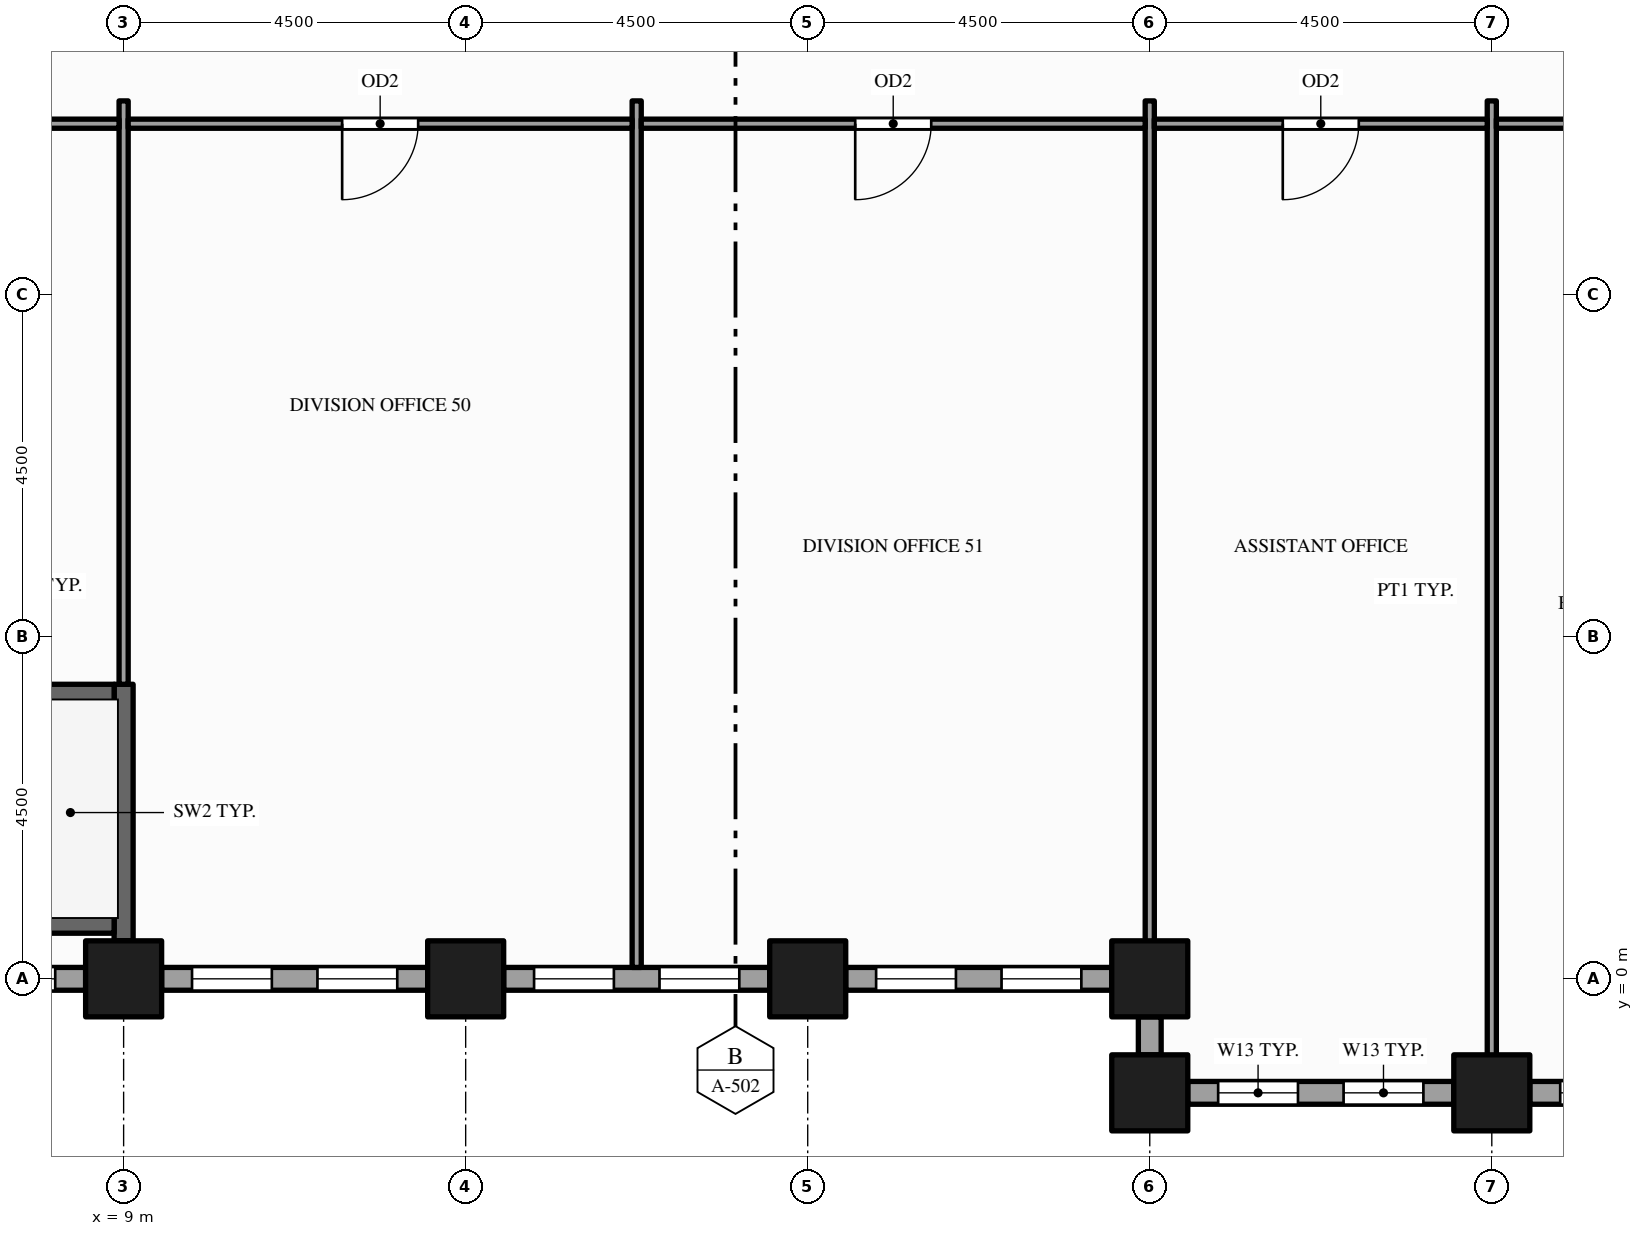
"""IFC4 building model, lengths in metres.
Left out: names, types, materials, properties, quantities, classifications, styles, units other than length and angle.
Written with IfcOpenShell. Run it as: python <this file> out.ifc"""

import sys

from ifc_helpers import new_model, si_unit, direction, frame, frame_2d, origin, origin_2d, place, context, subcontext, project, spatial, rectangle, hollow_rectangle, extrude, element, fill, save


model = new_model("IFC4")
c1 = context("Model", 3, precision=1e-05, world=origin(), true_north=direction((0.0, 1.0)))
c2 = subcontext(c1, "Body", "Model", "MODEL_VIEW")
j1 = project(units=[si_unit("LENGTHUNIT", "METRE"), si_unit("PLANEANGLEUNIT", "RADIAN")], contexts=[c1])
p1 = place(None, origin())
s1 = spatial("IfcSite", under=j1, at=p1, CompositionType="ELEMENT")
p2 = place(p1, origin())
s2 = spatial("IfcBuilding", under=s1, at=p2, CompositionType="ELEMENT")
p3 = place(p2, frame((0.0, 0.0, 83.0)))
s3 = spatial("IfcBuildingStorey", under=s2, at=p3, CompositionType="ELEMENT", Elevation=83.0)
for number, where, z_axis, x_axis in (
    (1, (9.0, 0.0, -0.15), (0.0, 0.0, 1.0), (1.0, 0.0, 0.0)),
    (2, (13.5, 0.0, -0.15), (0.0, 0.0, 1.0), (1.0, 0.0, 0.0)),
    (3, (18.0, 0.0, -0.15), (0.0, 0.0, 1.0), (1.0, 0.0, 0.0)),
    (4, (22.5, -1.5, -0.15), (0.0, 0.0, 1.0), (1.0, 0.0, 0.0)),
    (5, (22.5, 0.0, -0.15), (0.0, 0.0, 1.0), (1.0, 0.0, 0.0)),
    (6, (27.0, -1.5, -0.15), (0.0, 0.0, 1.0), (1.0, 0.0, 0.0)),
):
    element("IfcColumn", number, at=place(p3, frame(where, z_axis=z_axis, x_axis=x_axis)), inside=s3, PredefinedType="COLUMN", context=c2, shape_type="SweptSolid", body=[
        extrude(hollow_rectangle(XDim=1.0, YDim=1.0, WallThickness=0.05, at=origin_2d()), origin(), (0.0, 0.0, 1.0), 4.0),
    ])
p4 = place(p3, frame((23.0, -1.5, 0.0), z_axis=(0.0, 0.0, 1.0), x_axis=(1.0, 0.0, 0.0)))
e7 = element("IfcWall", 7, at=p4, inside=s3, PredefinedType="STANDARD", context=c2, shape_type="SweptSolid", body=[
    extrude(rectangle(XDim=3.5, YDim=0.3, at=frame_2d((1.75, 0.0))), origin(), (0.0, 0.0, 1.0), 3.154),
])
p5 = place(p4, frame((0.4, 0.0, 0.9)))
e8 = element("IfcOpeningElement", 8, at=p5, cuts=e7, PredefinedType="OPENING", context=c2, shape_type="SweptSolid", body=[
    extrude(rectangle(XDim=1.05, YDim=2.0, at=frame_2d((0.525, 1.0))), frame((0.0, 0.16, 0.0), z_axis=(0.0, -1.0, 0.0), x_axis=(1.0, 0.0, 0.0)), (0.0, 0.0, 1.0), 0.32),
])
p6 = place(p4, frame((2.05, 0.0, 0.9)))
e9 = element("IfcOpeningElement", 9, at=p6, cuts=e7, PredefinedType="OPENING", context=c2, shape_type="SweptSolid", body=[
    extrude(rectangle(XDim=1.05, YDim=2.0, at=frame_2d((0.525, 1.0))), frame((0.0, 0.16, 0.0), z_axis=(0.0, -1.0, 0.0), x_axis=(1.0, 0.0, 0.0)), (0.0, 0.0, 1.0), 0.32),
])
p7 = place(p3, frame((27.5, -1.5, 0.0), z_axis=(0.0, 0.0, 1.0), x_axis=(1.0, 0.0, 0.0)))
e10 = element("IfcWall", 10, at=p7, inside=s3, PredefinedType="STANDARD", context=c2, shape_type="SweptSolid", body=[
    extrude(rectangle(XDim=3.5, YDim=0.3, at=frame_2d((1.75, 0.0))), origin(), (0.0, 0.0, 1.0), 3.154),
])
p8 = place(p7, frame((0.4, 0.0, 0.9)))
e11 = element("IfcOpeningElement", 11, at=p8, cuts=e10, PredefinedType="OPENING", context=c2, shape_type="SweptSolid", body=[
    extrude(rectangle(XDim=1.05, YDim=2.0, at=frame_2d((0.525, 1.0))), frame((0.0, 0.16, 0.0), z_axis=(0.0, -1.0, 0.0), x_axis=(1.0, 0.0, 0.0)), (0.0, 0.0, 1.0), 0.32),
])
p9 = place(p7, frame((2.05, 0.0, 0.9)))
e12 = element("IfcOpeningElement", 12, at=p9, cuts=e10, PredefinedType="OPENING", context=c2, shape_type="SweptSolid", body=[
    extrude(rectangle(XDim=1.05, YDim=2.0, at=frame_2d((0.525, 1.0))), frame((0.0, 0.16, 0.0), z_axis=(0.0, -1.0, 0.0), x_axis=(1.0, 0.0, 0.0)), (0.0, 0.0, 1.0), 0.32),
])
p10 = place(p3, frame((5.0, 0.0, 0.0), z_axis=(0.0, 0.0, 1.0), x_axis=(1.0, 0.0, 0.0)))
e13 = element("IfcWall", 13, at=p10, inside=s3, PredefinedType="STANDARD", context=c2, shape_type="SweptSolid", body=[
    extrude(rectangle(XDim=3.5, YDim=0.3, at=frame_2d((1.75, 0.0))), origin(), (0.0, 0.0, 1.0), 3.154),
])
p11 = place(p10, frame((0.4, 0.0, 0.9)))
e14 = element("IfcOpeningElement", 14, at=p11, cuts=e13, PredefinedType="OPENING", context=c2, shape_type="SweptSolid", body=[
    extrude(rectangle(XDim=1.05, YDim=2.0, at=frame_2d((0.525, 1.0))), frame((0.0, 0.16, 0.0), z_axis=(0.0, -1.0, 0.0), x_axis=(1.0, 0.0, 0.0)), (0.0, 0.0, 1.0), 0.32),
])
p12 = place(p10, frame((2.05, 0.0, 0.9)))
e15 = element("IfcOpeningElement", 15, at=p12, cuts=e13, PredefinedType="OPENING", context=c2, shape_type="SweptSolid", body=[
    extrude(rectangle(XDim=1.05, YDim=2.0, at=frame_2d((0.525, 1.0))), frame((0.0, 0.16, 0.0), z_axis=(0.0, -1.0, 0.0), x_axis=(1.0, 0.0, 0.0)), (0.0, 0.0, 1.0), 0.32),
])
p13 = place(p3, frame((9.5, 0.0, 0.0), z_axis=(0.0, 0.0, 1.0), x_axis=(1.0, 0.0, 0.0)))
e16 = element("IfcWall", 16, at=p13, inside=s3, PredefinedType="STANDARD", context=c2, shape_type="SweptSolid", body=[
    extrude(rectangle(XDim=3.5, YDim=0.3, at=frame_2d((1.75, 0.0))), origin(), (0.0, 0.0, 1.0), 3.154),
])
p14 = place(p13, frame((0.4, 0.0, 0.9)))
e17 = element("IfcOpeningElement", 17, at=p14, cuts=e16, PredefinedType="OPENING", context=c2, shape_type="SweptSolid", body=[
    extrude(rectangle(XDim=1.05, YDim=2.0, at=frame_2d((0.525, 1.0))), frame((0.0, 0.16, 0.0), z_axis=(0.0, -1.0, 0.0), x_axis=(1.0, 0.0, 0.0)), (0.0, 0.0, 1.0), 0.32),
])
p15 = place(p13, frame((2.05, 0.0, 0.9)))
e18 = element("IfcOpeningElement", 18, at=p15, cuts=e16, PredefinedType="OPENING", context=c2, shape_type="SweptSolid", body=[
    extrude(rectangle(XDim=1.05, YDim=2.0, at=frame_2d((0.525, 1.0))), frame((0.0, 0.16, 0.0), z_axis=(0.0, -1.0, 0.0), x_axis=(1.0, 0.0, 0.0)), (0.0, 0.0, 1.0), 0.32),
])
p16 = place(p3, frame((14.0, 0.0, 0.0), z_axis=(0.0, 0.0, 1.0), x_axis=(1.0, 0.0, 0.0)))
e19 = element("IfcWall", 19, at=p16, inside=s3, PredefinedType="STANDARD", context=c2, shape_type="SweptSolid", body=[
    extrude(rectangle(XDim=3.5, YDim=0.3, at=frame_2d((1.75, 0.0))), origin(), (0.0, 0.0, 1.0), 3.154),
])
p17 = place(p16, frame((0.4, 0.0, 0.9)))
e20 = element("IfcOpeningElement", 20, at=p17, cuts=e19, PredefinedType="OPENING", context=c2, shape_type="SweptSolid", body=[
    extrude(rectangle(XDim=1.05, YDim=2.0, at=frame_2d((0.525, 1.0))), frame((0.0, 0.16, 0.0), z_axis=(0.0, -1.0, 0.0), x_axis=(1.0, 0.0, 0.0)), (0.0, 0.0, 1.0), 0.32),
])
p18 = place(p16, frame((2.05, 0.0, 0.9)))
e21 = element("IfcOpeningElement", 21, at=p18, cuts=e19, PredefinedType="OPENING", context=c2, shape_type="SweptSolid", body=[
    extrude(rectangle(XDim=1.05, YDim=2.0, at=frame_2d((0.525, 1.0))), frame((0.0, 0.16, 0.0), z_axis=(0.0, -1.0, 0.0), x_axis=(1.0, 0.0, 0.0)), (0.0, 0.0, 1.0), 0.32),
])
p19 = place(p3, frame((18.5, 0.0, 0.0), z_axis=(0.0, 0.0, 1.0), x_axis=(1.0, 0.0, 0.0)))
e22 = element("IfcWall", 22, at=p19, inside=s3, PredefinedType="STANDARD", context=c2, shape_type="SweptSolid", body=[
    extrude(rectangle(XDim=3.5, YDim=0.3, at=frame_2d((1.75, 0.0))), origin(), (0.0, 0.0, 1.0), 3.154),
])
p20 = place(p19, frame((0.4, 0.0, 0.9)))
e23 = element("IfcOpeningElement", 23, at=p20, cuts=e22, PredefinedType="OPENING", context=c2, shape_type="SweptSolid", body=[
    extrude(rectangle(XDim=1.05, YDim=2.0, at=frame_2d((0.525, 1.0))), frame((0.0, 0.16, 0.0), z_axis=(0.0, -1.0, 0.0), x_axis=(1.0, 0.0, 0.0)), (0.0, 0.0, 1.0), 0.32),
])
p21 = place(p19, frame((2.05, 0.0, 0.9)))
e24 = element("IfcOpeningElement", 24, at=p21, cuts=e22, PredefinedType="OPENING", context=c2, shape_type="SweptSolid", body=[
    extrude(rectangle(XDim=1.05, YDim=2.0, at=frame_2d((0.525, 1.0))), frame((0.0, 0.16, 0.0), z_axis=(0.0, -1.0, 0.0), x_axis=(1.0, 0.0, 0.0)), (0.0, 0.0, 1.0), 0.32),
])
p22 = place(p3, frame((22.5, -0.5, 0.0), z_axis=(0.0, 0.0, 1.0), x_axis=(0.0, -1.0, 0.0)))
e25 = element("IfcWall", 25, at=p22, inside=s3, PredefinedType="STANDARD", context=c2, shape_type="SweptSolid", body=[
    extrude(rectangle(XDim=0.5, YDim=0.3, at=frame_2d((0.25, 0.0))), origin(), (0.0, 0.0, 1.0), 3.154),
])
p23 = place(p3, frame((9.0, 0.15, 0.0), z_axis=(0.0, 0.0, 1.0), x_axis=(0.0, 1.0, 0.0)))
e26 = element("IfcWall", 26, at=p23, inside=s3, PredefinedType="PARTITIONING", context=c2, shape_type="SweptSolid", body=[
    extrude(rectangle(XDim=0.35, YDim=0.12, at=frame_2d((0.175, 0.0))), origin(), (0.0, 0.0, 1.0), 3.85),
])
p24 = place(p3, frame((9.0, 0.5, 0.0), z_axis=(0.0, 0.0, 1.0), x_axis=(0.0, 1.0, 0.0)))
e27 = element("IfcWall", 27, at=p24, inside=s3, PredefinedType="SHEAR", context=c2, shape_type="SweptSolid", body=[
    extrude(rectangle(XDim=3.375, YDim=0.25, at=frame_2d((1.688, 0.0))), origin(), (0.0, 0.0, 1.0), 3.85),
])
p25 = place(p3, frame((9.0, 3.875, 0.0), z_axis=(0.0, 0.0, 1.0), x_axis=(0.0, 1.0, 0.0)))
e28 = element("IfcWall", 28, at=p25, inside=s3, PredefinedType="PARTITIONING", context=c2, shape_type="SweptSolid", body=[
    extrude(rectangle(XDim=7.675, YDim=0.12, at=frame_2d((3.837, 0.0))), origin(), (0.0, 0.0, 1.0), 2.938),
])
for number, where, z_axis, x_axis in (
    (29, (15.75, 0.15, 0.0), (0.0, 0.0, 1.0), (0.0, 1.0, 0.0)),
    (30, (22.5, 0.15, 0.0), (0.0, 0.0, 1.0), (0.0, 1.0, 0.0)),
):
    element("IfcWall", number, at=place(p3, frame(where, z_axis=z_axis, x_axis=x_axis)), inside=s3, PredefinedType="PARTITIONING", context=c2, shape_type="SweptSolid", body=[
        extrude(rectangle(XDim=11.4, YDim=0.12, at=frame_2d((5.7, 0.0))), origin(), (0.0, 0.0, 1.0), 2.938),
    ])
p26 = place(p3, frame((27.0, -1.35, 0.0), z_axis=(0.0, 0.0, 1.0), x_axis=(0.0, 1.0, 0.0)))
e31 = element("IfcWall", 31, at=p26, inside=s3, PredefinedType="PARTITIONING", context=c2, shape_type="SweptSolid", body=[
    extrude(rectangle(XDim=12.9, YDim=0.12, at=frame_2d((6.45, 0.0))), origin(), (0.0, 0.0, 1.0), 2.938),
])
p27 = place(p3, frame((0.85, 0.725, 0.0), z_axis=(0.0, 0.0, 1.0), x_axis=(1.0, 0.0, 0.0)))
e32 = element("IfcWall", 32, at=p27, inside=s3, PredefinedType="SHEAR", context=c2, shape_type="SweptSolid", body=[
    extrude(rectangle(XDim=8.025, YDim=0.25, at=frame_2d((4.012, 0.0))), origin(), (0.0, 0.0, 1.0), 3.85),
])
p28 = place(p3, frame((0.85, 3.75, 0.0), z_axis=(0.0, 0.0, 1.0), x_axis=(1.0, 0.0, 0.0)))
e33 = element("IfcWall", 33, at=p28, inside=s3, PredefinedType="SHEAR", context=c2, shape_type="SweptSolid", body=[
    extrude(rectangle(XDim=8.025, YDim=0.25, at=frame_2d((4.012, 0.0))), origin(), (0.0, 0.0, 1.0), 3.85),
])
p29 = place(p28, frame((0.15, 0.0, 0.0)))
e34 = element("IfcOpeningElement", 34, at=p29, cuts=e33, PredefinedType="OPENING", context=c2, shape_type="SweptSolid", body=[
    extrude(rectangle(XDim=1.1, YDim=2.1, at=frame_2d((0.55, 1.05))), frame((0.0, 0.135, 0.0), z_axis=(0.0, -1.0, 0.0), x_axis=(1.0, 0.0, 0.0)), (0.0, 0.0, 1.0), 0.27),
])
p30 = place(p3, frame((0.15, 11.25, 0.0), z_axis=(0.0, 0.0, 1.0), x_axis=(1.0, 0.0, 0.0)))
e35 = element("IfcWall", 35, at=p30, inside=s3, PredefinedType="PARTITIONING", context=c2, shape_type="SweptSolid", body=[
    extrude(rectangle(XDim=8.79, YDim=0.12, at=frame_2d((4.395, 0.0))), origin(), (0.0, 0.0, 1.0), 2.938),
])
p31 = place(p30, frame((3.805, 0.0, 0.0)))
e36 = element("IfcOpeningElement", 36, at=p31, cuts=e35, PredefinedType="OPENING", context=c2, shape_type="SweptSolid", body=[
    extrude(rectangle(XDim=1.2, YDim=2.1, at=frame_2d((0.6, 1.05))), frame((0.0, 0.07, 0.0), z_axis=(0.0, -1.0, 0.0), x_axis=(1.0, 0.0, 0.0)), (0.0, 0.0, 1.0), 0.14),
])
p32 = place(p3, frame((9.06, 11.25, 0.0), z_axis=(0.0, 0.0, 1.0), x_axis=(1.0, 0.0, 0.0)))
e37 = element("IfcWall", 37, at=p32, inside=s3, PredefinedType="PARTITIONING", context=c2, shape_type="SweptSolid", body=[
    extrude(rectangle(XDim=6.63, YDim=0.12, at=frame_2d((3.315, 0.0))), origin(), (0.0, 0.0, 1.0), 2.938),
])
p33 = place(p32, frame((2.815, 0.0, 0.0)))
e38 = element("IfcOpeningElement", 38, at=p33, cuts=e37, PredefinedType="OPENING", context=c2, shape_type="SweptSolid", body=[
    extrude(rectangle(XDim=1.0, YDim=2.1, at=frame_2d((0.5, 1.05))), frame((0.0, 0.07, 0.0), z_axis=(0.0, -1.0, 0.0), x_axis=(1.0, 0.0, 0.0)), (0.0, 0.0, 1.0), 0.14),
])
p34 = place(p3, frame((15.81, 11.25, 0.0), z_axis=(0.0, 0.0, 1.0), x_axis=(1.0, 0.0, 0.0)))
e39 = element("IfcWall", 39, at=p34, inside=s3, PredefinedType="PARTITIONING", context=c2, shape_type="SweptSolid", body=[
    extrude(rectangle(XDim=6.63, YDim=0.12, at=frame_2d((3.315, 0.0))), origin(), (0.0, 0.0, 1.0), 2.938),
])
p35 = place(p34, frame((2.815, 0.0, 0.0)))
e40 = element("IfcOpeningElement", 40, at=p35, cuts=e39, PredefinedType="OPENING", context=c2, shape_type="SweptSolid", body=[
    extrude(rectangle(XDim=1.0, YDim=2.1, at=frame_2d((0.5, 1.05))), frame((0.0, 0.07, 0.0), z_axis=(0.0, -1.0, 0.0), x_axis=(1.0, 0.0, 0.0)), (0.0, 0.0, 1.0), 0.14),
])
p36 = place(p3, frame((22.56, 11.25, 0.0), z_axis=(0.0, 0.0, 1.0), x_axis=(1.0, 0.0, 0.0)))
e41 = element("IfcWall", 41, at=p36, inside=s3, PredefinedType="PARTITIONING", context=c2, shape_type="SweptSolid", body=[
    extrude(rectangle(XDim=4.38, YDim=0.12, at=frame_2d((2.19, 0.0))), origin(), (0.0, 0.0, 1.0), 2.76),
])
p37 = place(p36, frame((1.69, 0.0, 0.0)))
e42 = element("IfcOpeningElement", 42, at=p37, cuts=e41, PredefinedType="OPENING", context=c2, shape_type="SweptSolid", body=[
    extrude(rectangle(XDim=1.0, YDim=2.1, at=frame_2d((0.5, 1.05))), frame((0.0, 0.07, 0.0), z_axis=(0.0, -1.0, 0.0), x_axis=(1.0, 0.0, 0.0)), (0.0, 0.0, 1.0), 0.14),
])
p38 = place(p3, frame((27.06, 11.25, 0.0), z_axis=(0.0, 0.0, 1.0), x_axis=(1.0, 0.0, 0.0)))
e43 = element("IfcWall", 43, at=p38, inside=s3, PredefinedType="PARTITIONING", context=c2, shape_type="SweptSolid", body=[
    extrude(rectangle(XDim=4.38, YDim=0.12, at=frame_2d((2.19, 0.0))), origin(), (0.0, 0.0, 1.0), 2.938),
])
p39 = place(p38, frame((1.74, 0.0, 0.0)))
e44 = element("IfcOpeningElement", 44, at=p39, cuts=e43, PredefinedType="OPENING", context=c2, shape_type="SweptSolid", body=[
    extrude(rectangle(XDim=0.9, YDim=2.1, at=frame_2d((0.45, 1.05))), frame((0.0, 0.07, 0.0), z_axis=(0.0, -1.0, 0.0), x_axis=(1.0, 0.0, 0.0)), (0.0, 0.0, 1.0), 0.14),
])
p40 = place(p5, origin())
e45 = element("IfcWindow", 45, at=p40, inside=s3, PartitioningType="SINGLE_PANEL", PredefinedType="WINDOW", context=c2, shape_type="SweptSolid", body=[
    extrude(rectangle(XDim=1.05, YDim=2.0, at=frame_2d((0.525, 1.0))), frame((0.0, 0.03, 0.0), z_axis=(0.0, -1.0, 0.0), x_axis=(1.0, 0.0, 0.0)), (0.0, 0.0, 1.0), 0.06),
])
fill(e8, e45)
p41 = place(p6, origin())
e46 = element("IfcWindow", 46, at=p41, inside=s3, PartitioningType="SINGLE_PANEL", PredefinedType="WINDOW", context=c2, shape_type="SweptSolid", body=[
    extrude(rectangle(XDim=1.05, YDim=2.0, at=frame_2d((0.525, 1.0))), frame((0.0, 0.03, 0.0), z_axis=(0.0, -1.0, 0.0), x_axis=(1.0, 0.0, 0.0)), (0.0, 0.0, 1.0), 0.06),
])
fill(e9, e46)
p42 = place(p8, origin())
e47 = element("IfcWindow", 47, at=p42, inside=s3, PartitioningType="SINGLE_PANEL", PredefinedType="WINDOW", context=c2, shape_type="SweptSolid", body=[
    extrude(rectangle(XDim=1.05, YDim=2.0, at=frame_2d((0.525, 1.0))), frame((0.0, 0.03, 0.0), z_axis=(0.0, -1.0, 0.0), x_axis=(1.0, 0.0, 0.0)), (0.0, 0.0, 1.0), 0.06),
])
fill(e11, e47)
p43 = place(p12, origin())
e48 = element("IfcWindow", 48, at=p43, inside=s3, PartitioningType="SINGLE_PANEL", PredefinedType="WINDOW", context=c2, shape_type="SweptSolid", body=[
    extrude(rectangle(XDim=1.05, YDim=2.0, at=frame_2d((0.525, 1.0))), frame((0.0, 0.03, 0.0), z_axis=(0.0, -1.0, 0.0), x_axis=(1.0, 0.0, 0.0)), (0.0, 0.0, 1.0), 0.06),
])
fill(e15, e48)
p44 = place(p14, origin())
e49 = element("IfcWindow", 49, at=p44, inside=s3, PartitioningType="SINGLE_PANEL", PredefinedType="WINDOW", context=c2, shape_type="SweptSolid", body=[
    extrude(rectangle(XDim=1.05, YDim=2.0, at=frame_2d((0.525, 1.0))), frame((0.0, 0.03, 0.0), z_axis=(0.0, -1.0, 0.0), x_axis=(1.0, 0.0, 0.0)), (0.0, 0.0, 1.0), 0.06),
])
fill(e17, e49)
p45 = place(p15, origin())
e50 = element("IfcWindow", 50, at=p45, inside=s3, PartitioningType="SINGLE_PANEL", PredefinedType="WINDOW", context=c2, shape_type="SweptSolid", body=[
    extrude(rectangle(XDim=1.05, YDim=2.0, at=frame_2d((0.525, 1.0))), frame((0.0, 0.03, 0.0), z_axis=(0.0, -1.0, 0.0), x_axis=(1.0, 0.0, 0.0)), (0.0, 0.0, 1.0), 0.06),
])
fill(e18, e50)
p46 = place(p17, origin())
e51 = element("IfcWindow", 51, at=p46, inside=s3, PartitioningType="SINGLE_PANEL", PredefinedType="WINDOW", context=c2, shape_type="SweptSolid", body=[
    extrude(rectangle(XDim=1.05, YDim=2.0, at=frame_2d((0.525, 1.0))), frame((0.0, 0.03, 0.0), z_axis=(0.0, -1.0, 0.0), x_axis=(1.0, 0.0, 0.0)), (0.0, 0.0, 1.0), 0.06),
])
fill(e20, e51)
p47 = place(p18, origin())
e52 = element("IfcWindow", 52, at=p47, inside=s3, PartitioningType="SINGLE_PANEL", PredefinedType="WINDOW", context=c2, shape_type="SweptSolid", body=[
    extrude(rectangle(XDim=1.05, YDim=2.0, at=frame_2d((0.525, 1.0))), frame((0.0, 0.03, 0.0), z_axis=(0.0, -1.0, 0.0), x_axis=(1.0, 0.0, 0.0)), (0.0, 0.0, 1.0), 0.06),
])
fill(e21, e52)
p48 = place(p20, origin())
e53 = element("IfcWindow", 53, at=p48, inside=s3, PartitioningType="SINGLE_PANEL", PredefinedType="WINDOW", context=c2, shape_type="SweptSolid", body=[
    extrude(rectangle(XDim=1.05, YDim=2.0, at=frame_2d((0.525, 1.0))), frame((0.0, 0.03, 0.0), z_axis=(0.0, -1.0, 0.0), x_axis=(1.0, 0.0, 0.0)), (0.0, 0.0, 1.0), 0.06),
])
fill(e23, e53)
p49 = place(p21, origin())
e54 = element("IfcWindow", 54, at=p49, inside=s3, PartitioningType="SINGLE_PANEL", PredefinedType="WINDOW", context=c2, shape_type="SweptSolid", body=[
    extrude(rectangle(XDim=1.05, YDim=2.0, at=frame_2d((0.525, 1.0))), frame((0.0, 0.03, 0.0), z_axis=(0.0, -1.0, 0.0), x_axis=(1.0, 0.0, 0.0)), (0.0, 0.0, 1.0), 0.06),
])
fill(e24, e54)
p50 = place(p33, origin())
e55 = element("IfcDoor", 55, at=p50, inside=s3, OperationType="SINGLE_SWING_LEFT", PredefinedType="DOOR", context=c2, shape_type="SweptSolid", body=[
    extrude(rectangle(XDim=1.0, YDim=2.1, at=frame_2d((0.5, 1.05))), frame((0.0, 0.025, 0.0), z_axis=(0.0, -1.0, 0.0), x_axis=(1.0, 0.0, 0.0)), (0.0, 0.0, 1.0), 0.05),
])
fill(e38, e55)
p51 = place(p35, origin())
e56 = element("IfcDoor", 56, at=p51, inside=s3, OperationType="SINGLE_SWING_LEFT", PredefinedType="DOOR", context=c2, shape_type="SweptSolid", body=[
    extrude(rectangle(XDim=1.0, YDim=2.1, at=frame_2d((0.5, 1.05))), frame((0.0, 0.025, 0.0), z_axis=(0.0, -1.0, 0.0), x_axis=(1.0, 0.0, 0.0)), (0.0, 0.0, 1.0), 0.05),
])
fill(e40, e56)
p52 = place(p37, origin())
e57 = element("IfcDoor", 57, at=p52, inside=s3, OperationType="SINGLE_SWING_LEFT", PredefinedType="DOOR", context=c2, shape_type="SweptSolid", body=[
    extrude(rectangle(XDim=1.0, YDim=2.1, at=frame_2d((0.5, 1.05))), frame((0.0, 0.025, 0.0), z_axis=(0.0, -1.0, 0.0), x_axis=(1.0, 0.0, 0.0)), (0.0, 0.0, 1.0), 0.05),
])
fill(e42, e57)
save(model, sys.argv[1])
